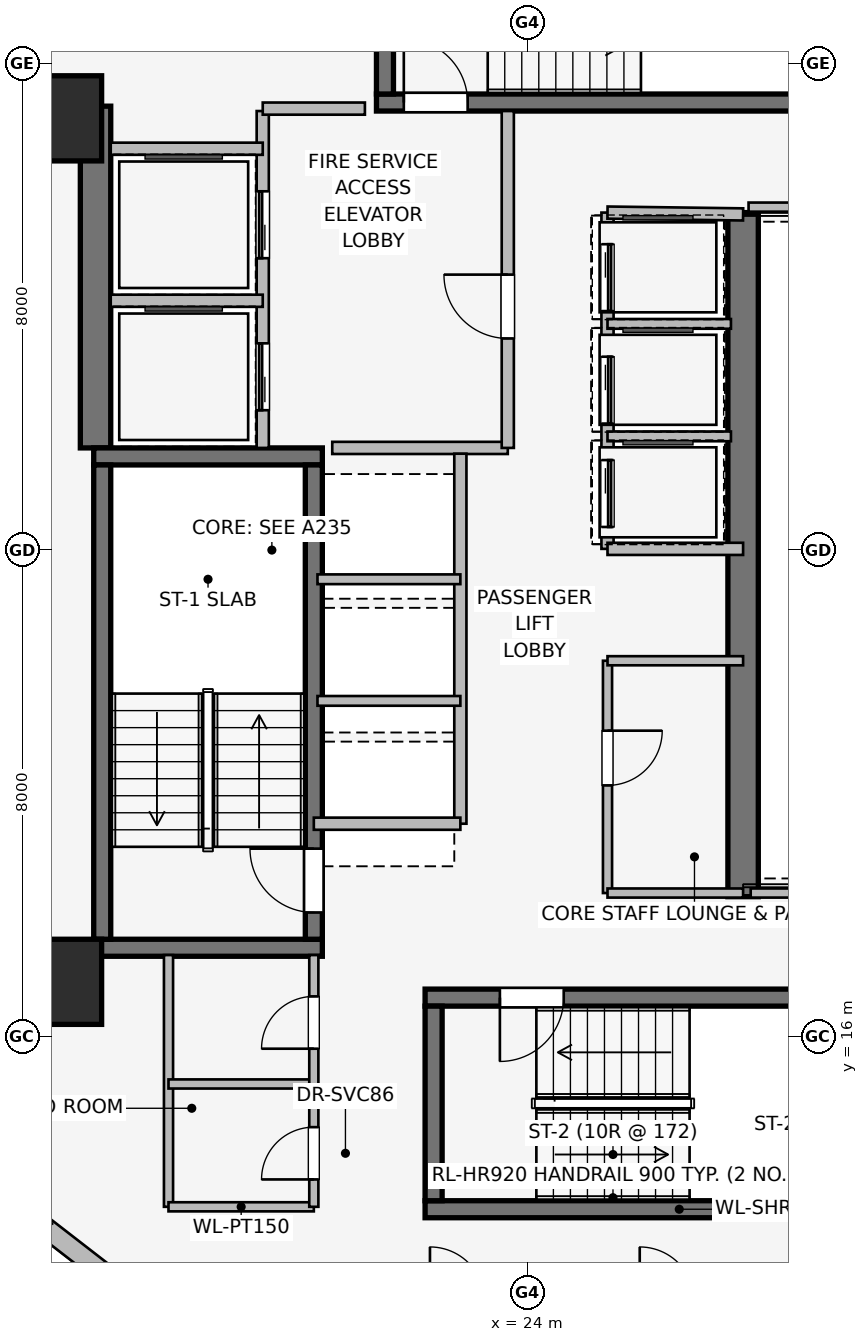
"""IFC4 building model, lengths in metres.
Left out: names, types, materials, properties, quantities, classifications, styles, units other than length and angle.
Written with IfcOpenShell. Run it as: python <this file> out.ifc"""

import sys

from ifc_helpers import new_model, si_unit, direction, frame, frame_2d, origin, origin_2d, place, context, subcontext, project, spatial, rectangle, extrude, element, fill, save


model = new_model("IFC4")
c1 = context("Model", 3, precision=1e-05, world=origin(), true_north=direction((0.0, 1.0)))
c2 = subcontext(c1, "Body", "Model", "MODEL_VIEW")
j1 = project(units=[si_unit("LENGTHUNIT", "METRE"), si_unit("PLANEANGLEUNIT", "RADIAN")], contexts=[c1])
p1 = place(None, origin())
s1 = spatial("IfcSite", under=j1, at=p1, CompositionType="ELEMENT")
p2 = place(p1, origin())
s2 = spatial("IfcBuilding", under=s1, at=p2, CompositionType="ELEMENT")
p3 = place(p2, frame((0.0, 0.0, 125.7)))
s3 = spatial("IfcBuildingStorey", under=s2, at=p3, CompositionType="ELEMENT", Elevation=125.7)
p4 = place(p3, frame((16.9, 25.68, 0.0), z_axis=(0.0, 0.0, 1.0), x_axis=(0.0, 1.0, 0.0)))
e1 = element("IfcWall", 1, at=p4, inside=s3, PredefinedType="SHEAR", context=c2, shape_type="SweptSolid", body=[
    extrude(rectangle(XDim=5.62, YDim=0.5, at=frame_2d((2.81, 0.0))), origin(), (0.0, 0.0, 1.0), 3.45),
])
p5 = place(p3, frame((27.55, 29.55, 0.0), z_axis=(0.0, 0.0, 1.0), x_axis=(0.0, -1.0, 0.0)))
e2 = element("IfcWall", 2, at=p5, inside=s3, PredefinedType="SHEAR", context=c2, shape_type="SweptSolid", body=[
    extrude(rectangle(XDim=11.25, YDim=0.5, at=frame_2d((5.625, 0.0))), origin(), (0.0, 0.0, 1.0), 3.45),
])
for number, where, z_axis, x_axis in (
    (3, (16.87, 17.46, 0.0), (0.0, 0.0, 1.0), (1.0, 0.0, 0.0)),
    (4, (20.63, 25.54, 0.0), (0.0, 0.0, 1.0), (-1.0, 0.0, 0.0)),
):
    element("IfcWall", number, at=place(p3, frame(where, z_axis=z_axis, x_axis=x_axis)), inside=s3, PredefinedType="SHEAR", context=c2, shape_type="SweptSolid", body=[
        extrude(rectangle(XDim=3.76, YDim=0.28, at=frame_2d((1.88, 0.0))), origin(), (0.0, 0.0, 1.0), 3.45),
    ])
p6 = place(p3, frame((17.01, 25.4, 0.0), z_axis=(0.0, 0.0, 1.0), x_axis=(0.0, -1.0, 0.0)))
e5 = element("IfcWall", 5, at=p6, inside=s3, PredefinedType="SHEAR", context=c2, shape_type="SweptSolid", body=[
    extrude(rectangle(XDim=7.8, YDim=0.28, at=frame_2d((3.9, 0.0))), origin(), (0.0, 0.0, 1.0), 3.45),
])
p7 = place(p3, frame((20.49, 17.6, 0.0), z_axis=(0.0, 0.0, 1.0), x_axis=(0.0, 1.0, 0.0)))
e6 = element("IfcWall", 6, at=p7, inside=s3, PredefinedType="SHEAR", context=c2, shape_type="SweptSolid", body=[
    extrude(rectangle(XDim=7.8, YDim=0.28, at=frame_2d((3.9, 0.0))), origin(), (0.0, 0.0, 1.0), 3.45),
])
p8 = place(p7, frame((0.44, 0.0, 0.0)))
e7 = element("IfcOpeningElement", 7, at=p8, cuts=e6, PredefinedType="OPENING", context=c2, shape_type="SweptSolid", body=[
    extrude(rectangle(XDim=1.05, YDim=2.0, at=frame_2d((0.525, 1.0))), frame((0.0, 0.15, 0.0), z_axis=(0.0, -1.0, 0.0), x_axis=(1.0, 0.0, 0.0)), (0.0, 0.0, 1.0), 0.3),
])
p9 = place(p3, frame((22.32, 13.16, 0.0), z_axis=(0.0, 0.0, 1.0), x_axis=(1.0, 0.0, 0.0)))
e8 = element("IfcWall", 8, at=p9, inside=s3, PredefinedType="SHEAR", context=c2, shape_type="SweptSolid", body=[
    extrude(rectangle(XDim=8.36, YDim=0.28, at=frame_2d((4.18, 0.0))), origin(), (0.0, 0.0, 1.0), 3.45),
])
p10 = place(p3, frame((30.68, 16.64, 0.0), z_axis=(0.0, 0.0, 1.0), x_axis=(-1.0, 0.0, 0.0)))
e9 = element("IfcWall", 9, at=p10, inside=s3, PredefinedType="SHEAR", context=c2, shape_type="SweptSolid", body=[
    extrude(rectangle(XDim=8.36, YDim=0.28, at=frame_2d((4.18, 0.0))), origin(), (0.0, 0.0, 1.0), 3.45),
])
p11 = place(p10, frame((6.08, 0.0, 0.0)))
e10 = element("IfcOpeningElement", 10, at=p11, cuts=e9, PredefinedType="OPENING", context=c2, shape_type="SweptSolid", body=[
    extrude(rectangle(XDim=1.05, YDim=2.0, at=frame_2d((0.525, 1.0))), frame((0.0, 0.15, 0.0), z_axis=(0.0, -1.0, 0.0), x_axis=(1.0, 0.0, 0.0)), (0.0, 0.0, 1.0), 0.3),
])
p12 = place(p3, frame((22.46, 16.5, 0.0), z_axis=(0.0, 0.0, 1.0), x_axis=(0.0, -1.0, 0.0)))
e11 = element("IfcWall", 11, at=p12, inside=s3, PredefinedType="SHEAR", context=c2, shape_type="SweptSolid", body=[
    extrude(rectangle(XDim=3.2, YDim=0.28, at=frame_2d((1.6, 0.0))), origin(), (0.0, 0.0, 1.0), 3.45),
])
p13 = place(p3, frame((21.52, 31.36, 0.0), z_axis=(0.0, 0.0, 1.0), x_axis=(1.0, 0.0, 0.0)))
e12 = element("IfcWall", 12, at=p13, inside=s3, PredefinedType="SHEAR", context=c2, shape_type="SweptSolid", body=[
    extrude(rectangle(XDim=8.36, YDim=0.28, at=frame_2d((4.18, 0.0))), origin(), (0.0, 0.0, 1.0), 3.45),
])
p14 = place(p13, frame((0.45, 0.0, 0.0)))
e13 = element("IfcOpeningElement", 13, at=p14, cuts=e12, PredefinedType="OPENING", context=c2, shape_type="SweptSolid", body=[
    extrude(rectangle(XDim=1.05, YDim=2.0, at=frame_2d((0.525, 1.0))), frame((0.0, 0.15, 0.0), z_axis=(0.0, -1.0, 0.0), x_axis=(1.0, 0.0, 0.0)), (0.0, 0.0, 1.0), 0.3),
])
p15 = place(p3, frame((21.66, 34.7, 0.0), z_axis=(0.0, 0.0, 1.0), x_axis=(0.0, -1.0, 0.0)))
e14 = element("IfcWall", 14, at=p15, inside=s3, PredefinedType="SHEAR", context=c2, shape_type="SweptSolid", body=[
    extrude(rectangle(XDim=3.2, YDim=0.28, at=frame_2d((1.6, 0.0))), origin(), (0.0, 0.0, 1.0), 3.45),
])
for number, where, z_axis, x_axis in (
    (15, (16.3, 16.9, 0.0), (0.0, 0.0, 1.0), (1.0, 0.0, 0.0)),
    (16, (16.3, 31.1, 0.0), (0.0, 0.0, 1.0), (1.0, 0.0, 0.0)),
):
    element("IfcColumn", number, at=place(p3, frame(where, z_axis=z_axis, x_axis=x_axis)), inside=s3, PredefinedType="COLUMN", context=c2, shape_type="SweptSolid", body=[
        extrude(rectangle(XDim=1.4, YDim=1.4, at=origin_2d()), origin(), (0.0, 0.0, 1.0), 3.45),
    ])
p16 = place(p3, frame((17.243, 11.95, 0.0), z_axis=(0.0, 0.0, 1.0), x_axis=(-0.790621329885, 0.612305408053, 0.0)))
e17 = element("IfcWall", 17, at=p16, inside=s3, PredefinedType="STANDARD", context=c2, shape_type="SweptSolid", body=[
    extrude(rectangle(XDim=1.676, YDim=0.33, at=frame_2d((0.838, 0.0))), origin(), (0.0, 0.0, 1.0), 3.19),
])
p17 = place(p3, frame((19.65, 25.68, 0.0), z_axis=(0.0, 0.0, 1.0), x_axis=(0.0, 1.0, 0.0)))
e18 = element("IfcWall", 18, at=p17, inside=s3, PredefinedType="PARTITIONING", context=c2, shape_type="SweptSolid", body=[
    extrude(rectangle(XDim=5.54, YDim=0.2, at=frame_2d((2.77, 0.0))), origin(), (0.0, 0.0, 1.0), 3.19),
])
p18 = place(p17, frame((0.62, 0.0, 0.0)))
e19 = element("IfcOpeningElement", 19, at=p18, cuts=e18, PredefinedType="OPENING", context=c2, shape_type="SweptSolid", body=[
    extrude(rectangle(XDim=1.1, YDim=2.2, at=frame_2d((0.55, 1.1))), frame((0.0, 0.11, 0.0), z_axis=(0.0, -1.0, 0.0), x_axis=(1.0, 0.0, 0.0)), (0.0, 0.0, 1.0), 0.22),
])
p19 = place(p17, frame((3.12, 0.0, 0.0)))
e20 = element("IfcOpeningElement", 20, at=p19, cuts=e18, PredefinedType="OPENING", context=c2, shape_type="SweptSolid", body=[
    extrude(rectangle(XDim=1.1, YDim=2.2, at=frame_2d((0.55, 1.1))), frame((0.0, 0.11, 0.0), z_axis=(0.0, -1.0, 0.0), x_axis=(1.0, 0.0, 0.0)), (0.0, 0.0, 1.0), 0.22),
])
p20 = place(p3, frame((20.793, 25.68, 0.0), z_axis=(0.0, 0.0, 1.0), x_axis=(1.0, 0.0, 0.0)))
e21 = element("IfcWall", 21, at=p20, inside=s3, PredefinedType="PARTITIONING", context=c2, shape_type="SweptSolid", body=[
    extrude(rectangle(XDim=2.887, YDim=0.2, at=frame_2d((1.443, 0.0))), origin(), (0.0, 0.0, 1.0), 3.19),
])
p21 = place(p3, frame((23.68, 25.68, 0.0), z_axis=(0.0, 0.0, 1.0), x_axis=(0.0, 1.0, 0.0)))
e22 = element("IfcWall", 22, at=p21, inside=s3, PredefinedType="PARTITIONING", context=c2, shape_type="SweptSolid", body=[
    extrude(rectangle(XDim=5.54, YDim=0.2, at=frame_2d((2.77, 0.0))), origin(), (0.0, 0.0, 1.0), 3.19),
])
p22 = place(p21, frame((1.8, 0.0, 0.0)))
e23 = element("IfcOpeningElement", 23, at=p22, cuts=e22, PredefinedType="OPENING", context=c2, shape_type="SweptSolid", body=[
    extrude(rectangle(XDim=1.05, YDim=2.0, at=frame_2d((0.525, 1.0))), frame((0.0, 0.11, 0.0), z_axis=(0.0, -1.0, 0.0), x_axis=(1.0, 0.0, 0.0)), (0.0, 0.0, 1.0), 0.22),
])
p23 = place(p3, frame((21.33, 31.26, 0.0), z_axis=(0.0, 0.0, 1.0), x_axis=(-1.0, 0.0, 0.0)))
e24 = element("IfcWall", 24, at=p23, inside=s3, PredefinedType="PARTITIONING", context=c2, shape_type="SweptSolid", body=[
    extrude(rectangle(XDim=1.68, YDim=0.2, at=frame_2d((0.84, 0.0))), origin(), (0.0, 0.0, 1.0), 3.19),
])
p24 = place(p3, frame((17.15, 28.1, 0.0), z_axis=(0.0, 0.0, 1.0), x_axis=(1.0, 0.0, 0.0)))
e25 = element("IfcWall", 25, at=p24, inside=s3, PredefinedType="PARTITIONING", context=c2, shape_type="SweptSolid", body=[
    extrude(rectangle(XDim=2.5, YDim=0.2, at=frame_2d((1.25, 0.0))), origin(), (0.0, 0.0, 1.0), 3.19),
])
p25 = place(p3, frame((19.65, 30.6, 0.0), z_axis=(0.0, 0.0, 1.0), x_axis=(-1.0, 0.0, 0.0)))
e26 = element("IfcWall", 26, at=p25, inside=s3, PredefinedType="PARTITIONING", context=c2, shape_type="SweptSolid", body=[
    extrude(rectangle(XDim=2.5, YDim=0.2, at=frame_2d((1.25, 0.0))), origin(), (0.0, 0.0, 1.0), 2.09),
])
p26 = place(p3, frame((22.9, 19.5, 0.0), z_axis=(0.0, 0.0, 1.0), x_axis=(0.0, 1.0, 0.0)))
e27 = element("IfcWall", 27, at=p26, inside=s3, PredefinedType="PARTITIONING", context=c2, shape_type="SweptSolid", body=[
    extrude(rectangle(XDim=6.085, YDim=0.2, at=frame_2d((3.042, 0.0))), origin(), (0.0, 0.0, 1.0), 3.19),
])
p27 = place(p3, frame((20.49, 19.5, 0.0), z_axis=(0.0, 0.0, 1.0), x_axis=(1.0, 0.0, 0.0)))
e28 = element("IfcWall", 28, at=p27, inside=s3, PredefinedType="PARTITIONING", context=c2, shape_type="SweptSolid", body=[
    extrude(rectangle(XDim=2.41, YDim=0.2, at=frame_2d((1.205, 0.0))), origin(), (0.0, 0.0, 1.0), 2.09),
])
for number, where, z_axis, x_axis in (
    (29, (20.55, 21.52, 0.0), (0.0, 0.0, 1.0), (1.0, 0.0, 0.0)),
    (30, (20.55, 23.52, 0.0), (0.0, 0.0, 1.0), (1.0, 0.0, 0.0)),
):
    element("IfcWall", number, at=place(p3, frame(where, z_axis=z_axis, x_axis=x_axis)), inside=s3, PredefinedType="PARTITIONING", context=c2, shape_type="SweptSolid", body=[
        extrude(rectangle(XDim=2.35, YDim=0.16, at=frame_2d((1.175, 0.0))), origin(), (0.0, 0.0, 1.0), 3.19),
    ])
p28 = place(p3, frame((25.32, 29.55, 0.0), z_axis=(0.0, 0.0, 1.0), x_axis=(0.0, -1.0, 0.0)))
e31 = element("IfcWall", 31, at=p28, inside=s3, PredefinedType="PARTITIONING", context=c2, shape_type="SweptSolid", body=[
    extrude(rectangle(XDim=5.53, YDim=0.2, at=frame_2d((2.765, 0.0))), origin(), (0.0, 0.0, 1.0), 3.19),
])
p29 = place(p28, frame((0.52, 0.0, 0.0)))
e32 = element("IfcOpeningElement", 32, at=p29, cuts=e31, PredefinedType="OPENING", context=c2, shape_type="SweptSolid", body=[
    extrude(rectangle(XDim=1.1, YDim=2.2, at=frame_2d((0.55, 1.1))), frame((0.0, 0.11, 0.0), z_axis=(0.0, -1.0, 0.0), x_axis=(1.0, 0.0, 0.0)), (0.0, 0.0, 1.0), 0.22),
])
p30 = place(p28, frame((2.37, 0.0, 0.0)))
e33 = element("IfcOpeningElement", 33, at=p30, cuts=e31, PredefinedType="OPENING", context=c2, shape_type="SweptSolid", body=[
    extrude(rectangle(XDim=1.1, YDim=2.2, at=frame_2d((0.55, 1.1))), frame((0.0, 0.11, 0.0), z_axis=(0.0, -1.0, 0.0), x_axis=(1.0, 0.0, 0.0)), (0.0, 0.0, 1.0), 0.22),
])
p31 = place(p28, frame((4.07, 0.0, 0.0)))
e34 = element("IfcOpeningElement", 34, at=p31, cuts=e31, PredefinedType="OPENING", context=c2, shape_type="SweptSolid", body=[
    extrude(rectangle(XDim=1.1, YDim=2.2, at=frame_2d((0.55, 1.1))), frame((0.0, 0.11, 0.0), z_axis=(0.0, -1.0, 0.0), x_axis=(1.0, 0.0, 0.0)), (0.0, 0.0, 1.0), 0.22),
])
p32 = place(p3, frame((27.55, 29.52, 0.0), z_axis=(0.0, 0.0, 1.0), x_axis=(-0.999909343457, 0.013464949556, 0.0)))
e35 = element("IfcWall", 35, at=p32, inside=s3, PredefinedType="PARTITIONING", context=c2, shape_type="SweptSolid", body=[
    extrude(rectangle(XDim=2.23, YDim=0.2, at=frame_2d((1.115, 0.0))), origin(), (0.0, 0.0, 1.0), 2.09),
])
p33 = place(p3, frame((25.32, 24.02, 0.0), z_axis=(0.0, 0.0, 1.0), x_axis=(1.0, 0.0, 0.0)))
e36 = element("IfcWall", 36, at=p33, inside=s3, PredefinedType="PARTITIONING", context=c2, shape_type="SweptSolid", body=[
    extrude(rectangle(XDim=2.23, YDim=0.2, at=frame_2d((1.115, 0.0))), origin(), (0.0, 0.0, 1.0), 3.19),
])
for number, where, z_axis, x_axis in (
    (37, (25.32, 25.87, 0.0), (0.0, 0.0, 1.0), (1.0, 0.0, 0.0)),
    (38, (25.32, 27.72, 0.0), (0.0, 0.0, 1.0), (1.0, 0.0, 0.0)),
):
    element("IfcWall", number, at=place(p3, frame(where, z_axis=z_axis, x_axis=x_axis)), inside=s3, PredefinedType="PARTITIONING", context=c2, shape_type="SweptSolid", body=[
        extrude(rectangle(XDim=2.03, YDim=0.16, at=frame_2d((1.015, 0.0))), origin(), (0.0, 0.0, 1.0), 3.19),
    ])
p34 = place(p3, frame((25.32, 22.18, 0.0), z_axis=(0.0, 0.0, 1.0), x_axis=(0.0, -1.0, 0.0)))
e39 = element("IfcWall", 39, at=p34, inside=s3, PredefinedType="PARTITIONING", context=c2, shape_type="SweptSolid", body=[
    extrude(rectangle(XDim=3.82, YDim=0.15, at=frame_2d((1.91, 0.0))), origin(), (0.0, 0.0, 1.0), 3.19),
])
p35 = place(p34, frame((1.15, 0.0, 0.0)))
e40 = element("IfcOpeningElement", 40, at=p35, cuts=e39, PredefinedType="OPENING", context=c2, shape_type="SweptSolid", body=[
    extrude(rectangle(XDim=0.9, YDim=2.0, at=frame_2d((0.45, 1.0))), frame((0.0, 0.085, 0.0), z_axis=(0.0, -1.0, 0.0), x_axis=(1.0, 0.0, 0.0)), (0.0, 0.0, 1.0), 0.17),
])
for number, where, z_axis, x_axis in (
    (41, (25.32, 22.18, 0.0), (0.0, 0.0, 1.0), (1.0, 0.0, 0.0)),
    (42, (25.32, 18.36, 0.0), (0.0, 0.0, 1.0), (1.0, 0.0, 0.0)),
):
    element("IfcWall", number, at=place(p3, frame(where, z_axis=z_axis, x_axis=x_axis)), inside=s3, PredefinedType="PARTITIONING", context=c2, shape_type="SweptSolid", body=[
        extrude(rectangle(XDim=2.23, YDim=0.15, at=frame_2d((1.115, 0.0))), origin(), (0.0, 0.0, 1.0), 3.19),
    ])
p36 = place(p3, frame((18.1, 17.34, 0.0), z_axis=(0.0, 0.0, 1.0), x_axis=(0.0, -1.0, 0.0)))
e43 = element("IfcWall", 43, at=p36, inside=s3, PredefinedType="PARTITIONING", context=c2, shape_type="SweptSolid", body=[
    extrude(rectangle(XDim=4.14, YDim=0.15, at=frame_2d((2.07, 0.0))), origin(), (0.0, 0.0, 1.0), 3.19),
])
for number, where, z_axis, x_axis in (
    (44, (18.1, 13.2, 0.0), (0.0, 0.0, 1.0), (1.0, 0.0, 0.0)),
    (45, (18.1, 15.22, 0.0), (0.0, 0.0, 1.0), (1.0, 0.0, 0.0)),
):
    element("IfcWall", number, at=place(p3, frame(where, z_axis=z_axis, x_axis=x_axis)), inside=s3, PredefinedType="PARTITIONING", context=c2, shape_type="SweptSolid", body=[
        extrude(rectangle(XDim=2.39, YDim=0.15, at=frame_2d((1.195, 0.0))), origin(), (0.0, 0.0, 1.0), 3.19),
    ])
p37 = place(p3, frame((20.49, 13.2, 0.0), z_axis=(0.0, 0.0, 1.0), x_axis=(0.0, 1.0, 0.0)))
e46 = element("IfcWall", 46, at=p37, inside=s3, PredefinedType="PARTITIONING", context=c2, shape_type="SweptSolid", body=[
    extrude(rectangle(XDim=4.14, YDim=0.15, at=frame_2d((2.07, 0.0))), origin(), (0.0, 0.0, 1.0), 3.19),
])
p38 = place(p37, frame((0.45, 0.0, 0.0)))
e47 = element("IfcOpeningElement", 47, at=p38, cuts=e46, PredefinedType="OPENING", context=c2, shape_type="SweptSolid", body=[
    extrude(rectangle(XDim=0.86, YDim=2.0, at=frame_2d((0.43, 1.0))), frame((0.0, 0.085, 0.0), z_axis=(0.0, -1.0, 0.0), x_axis=(1.0, 0.0, 0.0)), (0.0, 0.0, 1.0), 0.17),
])
p39 = place(p37, frame((2.6, 0.0, 0.0)))
e48 = element("IfcOpeningElement", 48, at=p39, cuts=e46, PredefinedType="OPENING", context=c2, shape_type="SweptSolid", body=[
    extrude(rectangle(XDim=0.86, YDim=2.0, at=frame_2d((0.43, 1.0))), frame((0.0, 0.085, 0.0), z_axis=(0.0, -1.0, 0.0), x_axis=(1.0, 0.0, 0.0)), (0.0, 0.0, 1.0), 0.17),
])
p40 = place(p3, frame((27.675, 18.36, 0.0), z_axis=(0.0, 0.0, 1.0), x_axis=(1.0, 0.0, 0.0)))
e49 = element("IfcWall", 49, at=p40, inside=s3, PredefinedType="PARTITIONING", context=c2, shape_type="SweptSolid", body=[
    extrude(rectangle(XDim=12.165, YDim=0.15, at=frame_2d((6.083, 0.0))), origin(), (0.0, 0.0, 1.0), 2.331),
])
p41 = place(p3, frame((39.84, 29.64, 0.0), z_axis=(0.0, 0.0, 1.0), x_axis=(-1.0, 0.0, 0.0)))
e50 = element("IfcWall", 50, at=p41, inside=s3, PredefinedType="PARTITIONING", context=c2, shape_type="SweptSolid", body=[
    extrude(rectangle(XDim=12.2, YDim=0.15, at=frame_2d((6.1, 0.0))), origin(), (0.0, 0.0, 1.0), 2.331),
])
p42 = place(p8, origin())
e51 = element("IfcDoor", 51, at=p42, inside=s3, OperationType="SINGLE_SWING_RIGHT", PredefinedType="DOOR", context=c2, shape_type="SweptSolid", body=[
    extrude(rectangle(XDim=1.05, YDim=2.0, at=frame_2d((0.525, 1.0))), frame((0.0, 0.025, 0.0), z_axis=(0.0, -1.0, 0.0), x_axis=(1.0, 0.0, 0.0)), (0.0, 0.0, 1.0), 0.05),
])
fill(e7, e51)
p43 = place(p11, origin())
e52 = element("IfcDoor", 52, at=p43, inside=s3, OperationType="SINGLE_SWING_RIGHT", PredefinedType="DOOR", context=c2, shape_type="SweptSolid", body=[
    extrude(rectangle(XDim=1.05, YDim=2.0, at=frame_2d((0.525, 1.0))), frame((0.0, 0.025, 0.0), z_axis=(0.0, -1.0, 0.0), x_axis=(1.0, 0.0, 0.0)), (0.0, 0.0, 1.0), 0.05),
])
fill(e10, e52)
p44 = place(p14, origin())
e53 = element("IfcDoor", 53, at=p44, inside=s3, OperationType="SINGLE_SWING_LEFT", PredefinedType="DOOR", context=c2, shape_type="SweptSolid", body=[
    extrude(rectangle(XDim=1.05, YDim=2.0, at=frame_2d((0.525, 1.0))), frame((0.0, 0.025, 0.0), z_axis=(0.0, -1.0, 0.0), x_axis=(1.0, 0.0, 0.0)), (0.0, 0.0, 1.0), 0.05),
])
fill(e13, e53)
p45 = place(p18, origin())
e54 = element("IfcDoor", 54, at=p45, inside=s3, OperationType="SLIDING_TO_LEFT", PredefinedType="DOOR", context=c2, shape_type="SweptSolid", body=[
    extrude(rectangle(XDim=1.1, YDim=2.2, at=frame_2d((0.55, 1.1))), frame((0.0, 0.025, 0.0), z_axis=(0.0, -1.0, 0.0), x_axis=(1.0, 0.0, 0.0)), (0.0, 0.0, 1.0), 0.05),
])
fill(e19, e54)
p46 = place(p19, origin())
e55 = element("IfcDoor", 55, at=p46, inside=s3, OperationType="SLIDING_TO_LEFT", PredefinedType="DOOR", context=c2, shape_type="SweptSolid", body=[
    extrude(rectangle(XDim=1.1, YDim=2.2, at=frame_2d((0.55, 1.1))), frame((0.0, 0.025, 0.0), z_axis=(0.0, -1.0, 0.0), x_axis=(1.0, 0.0, 0.0)), (0.0, 0.0, 1.0), 0.05),
])
fill(e20, e55)
p47 = place(p22, origin())
e56 = element("IfcDoor", 56, at=p47, inside=s3, OperationType="SINGLE_SWING_RIGHT", PredefinedType="DOOR", context=c2, shape_type="SweptSolid", body=[
    extrude(rectangle(XDim=1.05, YDim=2.0, at=frame_2d((0.525, 1.0))), frame((0.0, 0.025, 0.0), z_axis=(0.0, -1.0, 0.0), x_axis=(1.0, 0.0, 0.0)), (0.0, 0.0, 1.0), 0.05),
])
fill(e23, e56)
p48 = place(p29, origin())
e57 = element("IfcDoor", 57, at=p48, inside=s3, OperationType="SLIDING_TO_LEFT", PredefinedType="DOOR", context=c2, shape_type="SweptSolid", body=[
    extrude(rectangle(XDim=1.1, YDim=2.2, at=frame_2d((0.55, 1.1))), frame((0.0, 0.025, 0.0), z_axis=(0.0, -1.0, 0.0), x_axis=(1.0, 0.0, 0.0)), (0.0, 0.0, 1.0), 0.05),
])
fill(e32, e57)
p49 = place(p30, origin())
e58 = element("IfcDoor", 58, at=p49, inside=s3, OperationType="SLIDING_TO_LEFT", PredefinedType="DOOR", context=c2, shape_type="SweptSolid", body=[
    extrude(rectangle(XDim=1.1, YDim=2.2, at=frame_2d((0.55, 1.1))), frame((0.0, 0.025, 0.0), z_axis=(0.0, -1.0, 0.0), x_axis=(1.0, 0.0, 0.0)), (0.0, 0.0, 1.0), 0.05),
])
fill(e33, e58)
p50 = place(p31, origin())
e59 = element("IfcDoor", 59, at=p50, inside=s3, OperationType="SLIDING_TO_LEFT", PredefinedType="DOOR", context=c2, shape_type="SweptSolid", body=[
    extrude(rectangle(XDim=1.1, YDim=2.2, at=frame_2d((0.55, 1.1))), frame((0.0, 0.025, 0.0), z_axis=(0.0, -1.0, 0.0), x_axis=(1.0, 0.0, 0.0)), (0.0, 0.0, 1.0), 0.05),
])
fill(e34, e59)
p51 = place(p35, origin())
e60 = element("IfcDoor", 60, at=p51, inside=s3, OperationType="SINGLE_SWING_LEFT", PredefinedType="DOOR", context=c2, shape_type="SweptSolid", body=[
    extrude(rectangle(XDim=0.9, YDim=2.0, at=frame_2d((0.45, 1.0))), frame((0.0, 0.025, 0.0), z_axis=(0.0, -1.0, 0.0), x_axis=(1.0, 0.0, 0.0)), (0.0, 0.0, 1.0), 0.05),
])
fill(e40, e60)
p52 = place(p38, origin())
e61 = element("IfcDoor", 61, at=p52, inside=s3, OperationType="SINGLE_SWING_LEFT", PredefinedType="DOOR", context=c2, shape_type="SweptSolid", body=[
    extrude(rectangle(XDim=0.86, YDim=2.0, at=frame_2d((0.43, 1.0))), frame((0.0, 0.025, 0.0), z_axis=(0.0, -1.0, 0.0), x_axis=(1.0, 0.0, 0.0)), (0.0, 0.0, 1.0), 0.05),
])
fill(e47, e61)
p53 = place(p39, origin())
e62 = element("IfcDoor", 62, at=p53, inside=s3, OperationType="SINGLE_SWING_LEFT", PredefinedType="DOOR", context=c2, shape_type="SweptSolid", body=[
    extrude(rectangle(XDim=0.86, YDim=2.0, at=frame_2d((0.43, 1.0))), frame((0.0, 0.025, 0.0), z_axis=(0.0, -1.0, 0.0), x_axis=(1.0, 0.0, 0.0)), (0.0, 0.0, 1.0), 0.05),
])
fill(e48, e62)
save(model, sys.argv[1])
